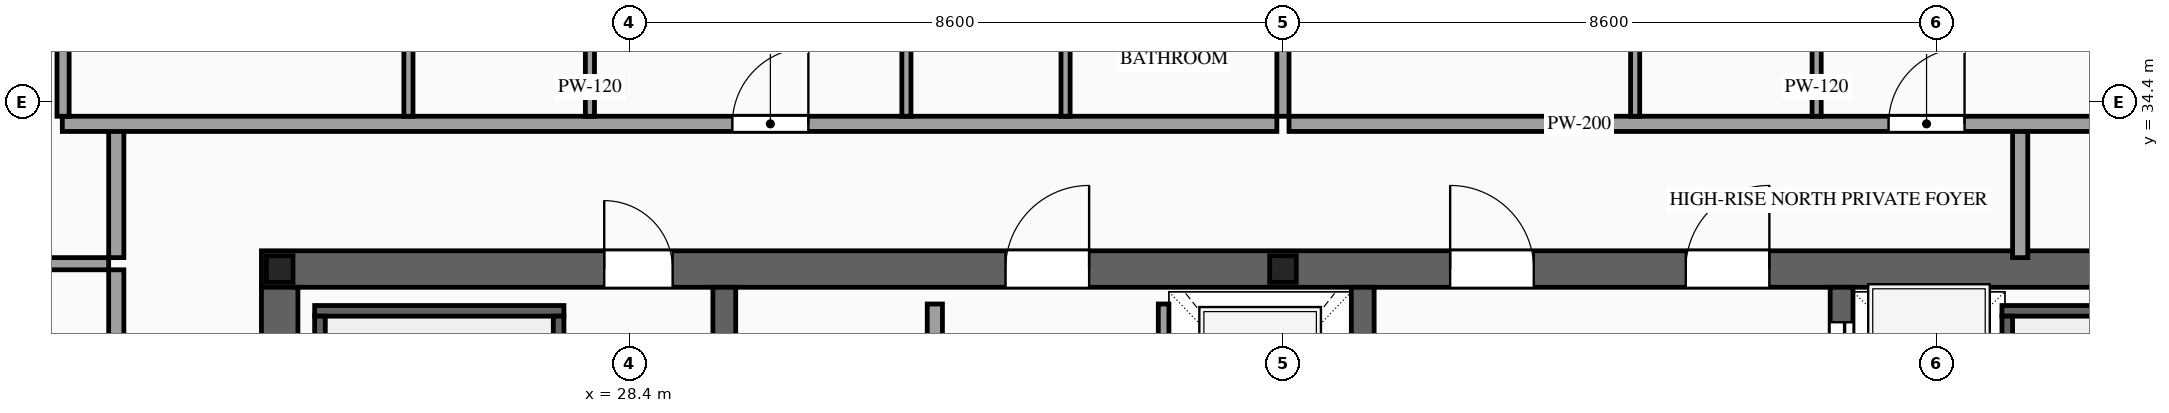
"""IFC4 building model, lengths in metres.
Left out: names, types, materials, properties, quantities, classifications, styles, units other than length and angle.
Written with IfcOpenShell. Run it as: python <this file> out.ifc"""

import sys

from ifc_helpers import new_model, si_unit, direction, frame, frame_2d, origin, origin_2d, place, context, subcontext, project, spatial, rectangle, i_section, extrude, source, transform, mapped, element, fill, save


model = new_model("IFC4")
c1 = context("Model", 3, precision=1e-05, world=origin(), true_north=direction((0.0, 1.0)))
c2 = subcontext(c1, "Body", "Model", "MODEL_VIEW")
j1 = project(units=[si_unit("LENGTHUNIT", "METRE"), si_unit("PLANEANGLEUNIT", "RADIAN")], contexts=[c1])
p1 = place(None, origin())
s1 = spatial("IfcSite", under=j1, at=p1, CompositionType="ELEMENT")
p2 = place(p1, origin())
s2 = spatial("IfcBuilding", under=s1, at=p2, CompositionType="ELEMENT")
p3 = place(p2, frame((0.0, 0.0, 335.7)))
s3 = spatial("IfcBuildingStorey", under=s2, at=p3, CompositionType="ELEMENT", Elevation=335.7)
p4 = place(p3, frame((23.56, 32.2, 0.0), z_axis=(0.0, 0.0, 1.0), x_axis=(1.0, 0.0, 0.0)))
e1 = element("IfcWall", 1, at=p4, inside=s3, PredefinedType="SHEAR", context=c2, shape_type="SweptSolid", body=[
    extrude(rectangle(XDim=26.88, YDim=0.48, at=frame_2d((13.44, 0.0))), origin(), (0.0, 0.0, 1.0), 3.5),
])
p5 = place(p4, frame((4.51, 0.0, 0.0)))
e2 = element("IfcOpeningElement", 2, at=p5, cuts=e1, PredefinedType="OPENING", context=c2, shape_type="SweptSolid", body=[
    extrude(rectangle(XDim=0.9, YDim=2.15, at=frame_2d((0.45, 1.075))), frame((0.0, 0.255, 0.0), z_axis=(0.0, -1.0, 0.0), x_axis=(1.0, 0.0, 0.0)), (0.0, 0.0, 1.0), 0.51),
])
p6 = place(p4, frame((9.79, 0.0, 0.0)))
e3 = element("IfcOpeningElement", 3, at=p6, cuts=e1, PredefinedType="OPENING", context=c2, shape_type="SweptSolid", body=[
    extrude(rectangle(XDim=1.1, YDim=2.2, at=frame_2d((0.55, 1.1))), frame((0.0, 0.255, 0.0), z_axis=(0.0, -1.0, 0.0), x_axis=(1.0, 0.0, 0.0)), (0.0, 0.0, 1.0), 0.51),
])
p7 = place(p4, frame((15.64, 0.0, 0.0)))
e4 = element("IfcOpeningElement", 4, at=p7, cuts=e1, PredefinedType="OPENING", context=c2, shape_type="SweptSolid", body=[
    extrude(rectangle(XDim=1.1, YDim=2.2, at=frame_2d((0.55, 1.1))), frame((0.0, 0.255, 0.0), z_axis=(0.0, -1.0, 0.0), x_axis=(1.0, 0.0, 0.0)), (0.0, 0.0, 1.0), 0.51),
])
p8 = place(p4, frame((18.74, 0.0, 0.0)))
e5 = element("IfcOpeningElement", 5, at=p8, cuts=e1, PredefinedType="OPENING", context=c2, shape_type="SweptSolid", body=[
    extrude(rectangle(XDim=1.1, YDim=2.2, at=frame_2d((0.55, 1.1))), frame((0.0, 0.255, 0.0), z_axis=(0.0, -1.0, 0.0), x_axis=(1.0, 0.0, 0.0)), (0.0, 0.0, 1.0), 0.51),
])
m1 = source(origin(), c2, "Body", "SweptSolid", [
    extrude(rectangle(XDim=12.32, YDim=0.48, at=frame_2d((6.16, 0.0))), origin(), (0.0, 0.0, 1.0), 3.5),
])
p9 = place(p3, frame((23.8, 19.64, 0.0), z_axis=(0.0, 0.0, 1.0), x_axis=(0.0, 1.0, 0.0)))
e6 = element("IfcWall", 6, at=p9, inside=s3, PredefinedType="SHEAR", context=c2, shape_type="MappedRepresentation", body=[
    mapped(m1, transform((0.0, 0.0, 0.0), scale=1.0)),
])
m2 = source(origin(), c2, "Body", "SweptSolid", [
    extrude(rectangle(XDim=12.32, YDim=0.3, at=frame_2d((6.16, 0.0))), origin(), (0.0, 0.0, 1.0), 3.5),
])
for number, where, z_axis, x_axis in (
    (7, (29.65, 19.64, 0.0), (0.0, 0.0, 1.0), (0.0, 1.0, 0.0)),
    (8, (38.05, 19.64, 0.0), (0.0, 0.0, 1.0), (0.0, 1.0, 0.0)),
):
    element("IfcWall", number, at=place(p3, frame(where, z_axis=z_axis, x_axis=x_axis)), inside=s3, PredefinedType="SOLIDWALL", context=c2, shape_type="MappedRepresentation", body=[
        mapped(m2, transform((0.0, 0.0, 0.0), scale=1.0)),
    ])
p10 = place(p3, frame((44.35, 19.64, 0.0), z_axis=(0.0, 0.0, 1.0), x_axis=(0.0, 1.0, 0.0)))
e9 = element("IfcWall", 9, at=p10, inside=s3, PredefinedType="SOLIDWALL", context=c2, shape_type="SweptSolid", body=[
    extrude(rectangle(XDim=12.32, YDim=0.3, at=frame_2d((6.16, 0.0))), origin(), (0.0, 0.0, 1.0), 3.5),
])
p11 = place(p10, frame((6.56, 0.0, 0.0)))
e10 = element("IfcOpeningElement", 10, at=p11, cuts=e9, PredefinedType="OPENING", context=c2, shape_type="SweptSolid", body=[
    extrude(rectangle(XDim=1.1, YDim=2.2, at=frame_2d((0.55, 1.1))), frame((0.0, 0.165, 0.0), z_axis=(0.0, -1.0, 0.0), x_axis=(1.0, 0.0, 0.0)), (0.0, 0.0, 1.0), 0.33),
])
p12 = place(p10, frame((8.66, 0.0, 0.0)))
e11 = element("IfcOpeningElement", 11, at=p12, cuts=e9, PredefinedType="OPENING", context=c2, shape_type="SweptSolid", body=[
    extrude(rectangle(XDim=1.1, YDim=2.2, at=frame_2d((0.55, 1.1))), frame((0.0, 0.165, 0.0), z_axis=(0.0, -1.0, 0.0), x_axis=(1.0, 0.0, 0.0)), (0.0, 0.0, 1.0), 0.33),
])
p13 = place(p10, frame((10.76, 0.0, 0.0)))
e12 = element("IfcOpeningElement", 12, at=p13, cuts=e9, PredefinedType="OPENING", context=c2, shape_type="SweptSolid", body=[
    extrude(rectangle(XDim=1.1, YDim=2.2, at=frame_2d((0.55, 1.1))), frame((0.0, 0.165, 0.0), z_axis=(0.0, -1.0, 0.0), x_axis=(1.0, 0.0, 0.0)), (0.0, 0.0, 1.0), 0.33),
])
m3 = source(origin(), c2, "Body", "SweptSolid", [
    extrude(i_section(OverallWidth=0.35, OverallDepth=0.35, WebThickness=0.012, FlangeThickness=0.019, at=origin_2d()), origin(), (0.0, 0.0, 1.0), 3.5),
])
for number, where, z_axis, x_axis in (
    (13, (23.8, 32.2, 0.0), (0.0, 0.0, 1.0), (1.0, 0.0, 0.0)),
    (14, (37.0, 32.2, 0.0), (0.0, 0.0, 1.0), (1.0, 0.0, 0.0)),
):
    element("IfcColumn", number, at=place(p3, frame(where, z_axis=z_axis, x_axis=x_axis)), inside=s3, PredefinedType="COLUMN", context=c2, shape_type="MappedRepresentation", body=[
        mapped(m3, transform((0.0, 0.0, 0.0), scale=1.0)),
    ])
p14 = place(p3, frame((35.43, 29.4, 0.0), z_axis=(0.0, 0.0, 1.0), x_axis=(0.0, 1.0, 0.0)))
e15 = element("IfcWall", 15, at=p14, inside=s3, PredefinedType="SOLIDWALL", context=c2, shape_type="SweptSolid", body=[
    extrude(rectangle(XDim=2.34, YDim=0.14, at=frame_2d((1.17, 0.0))), origin(), (0.0, 0.0, 1.0), 3.26),
])
p15 = place(p14, frame((0.62, 0.0, 0.0)))
e16 = element("IfcOpeningElement", 16, at=p15, cuts=e15, PredefinedType="OPENING", context=c2, shape_type="SweptSolid", body=[
    extrude(rectangle(XDim=1.1, YDim=2.2, at=frame_2d((0.55, 1.1))), frame((0.0, 0.085, 0.0), z_axis=(0.0, -1.0, 0.0), x_axis=(1.0, 0.0, 0.0)), (0.0, 0.0, 1.0), 0.17),
])
m4 = source(origin(), c2, "Body", "SweptSolid", [
    extrude(rectangle(XDim=3.28, YDim=0.14, at=frame_2d((1.64, 0.0))), origin(), (0.0, 0.0, 1.0), 3.26),
])
p16 = place(p3, frame((24.26, 31.65, 0.0), z_axis=(0.0, 0.0, 1.0), x_axis=(1.0, 0.0, 0.0)))
e17 = element("IfcWall", 17, at=p16, inside=s3, PredefinedType="SOLIDWALL", context=c2, shape_type="MappedRepresentation", body=[
    mapped(m4, transform((0.0, 0.0, 0.0), scale=1.0)),
])
m5 = source(origin(), c2, "Body", "SweptSolid", [
    extrude(rectangle(XDim=8.94, YDim=0.14, at=frame_2d((4.47, 0.0))), origin(), (0.0, 0.0, 1.0), 3.26),
])
for number, where, z_axis, x_axis in (
    (18, (24.33, 22.64, 0.0), (0.0, 0.0, 1.0), (0.0, 1.0, 0.0)),
    (19, (27.47, 22.64, 0.0), (0.0, 0.0, 1.0), (0.0, 1.0, 0.0)),
):
    element("IfcWall", number, at=place(p3, frame(where, z_axis=z_axis, x_axis=x_axis)), inside=s3, PredefinedType="SOLIDWALL", context=c2, shape_type="MappedRepresentation", body=[
        mapped(m5, transform((0.0, 0.0, 0.0), scale=1.0)),
    ])
p17 = place(p3, frame((46.46, 31.65, 0.0), z_axis=(0.0, 0.0, 1.0), x_axis=(1.0, 0.0, 0.0)))
e20 = element("IfcWall", 20, at=p17, inside=s3, PredefinedType="SOLIDWALL", context=c2, shape_type="MappedRepresentation", body=[
    mapped(m4, transform((0.0, 0.0, 0.0), scale=1.0)),
])
p18 = place(p3, frame((46.53, 22.64, 0.0), z_axis=(0.0, 0.0, 1.0), x_axis=(0.0, 1.0, 0.0)))
e21 = element("IfcWall", 21, at=p18, inside=s3, PredefinedType="SOLIDWALL", context=c2, shape_type="MappedRepresentation", body=[
    mapped(m5, transform((0.0, 0.0, 0.0), scale=1.0)),
])
p19 = place(p3, frame((32.42, 24.05, 0.0), z_axis=(0.0, 0.0, 1.0), x_axis=(0.0, 1.0, 0.0)))
e22 = element("IfcWall", 22, at=p19, inside=s3, PredefinedType="PARTITIONING", context=c2, shape_type="SweptSolid", body=[
    extrude(rectangle(XDim=7.69, YDim=0.2, at=frame_2d((3.845, 0.0))), origin(), (0.0, 0.0, 1.0), 3.26),
])
p20 = place(p19, frame((3.395, 0.0, 0.0)))
e23 = element("IfcOpeningElement", 23, at=p20, cuts=e22, PredefinedType="OPENING", context=c2, shape_type="SweptSolid", body=[
    extrude(rectangle(XDim=0.9, YDim=2.15, at=frame_2d((0.45, 1.075))), frame((0.0, 0.115, 0.0), z_axis=(0.0, -1.0, 0.0), x_axis=(1.0, 0.0, 0.0)), (0.0, 0.0, 1.0), 0.23),
])
m6 = source(origin(), c2, "Body", "SweptSolid", [
    extrude(rectangle(XDim=1.7, YDim=0.2, at=frame_2d((0.85, 0.0))), origin(), (0.0, 0.0, 1.0), 3.26),
])
for number, where, z_axis, x_axis in (
    (24, (21.65, 32.35, 0.0), (0.0, 0.0, 1.0), (0.0, 1.0, 0.0)),
    (25, (46.7, 32.35, 0.0), (0.0, 0.0, 1.0), (0.0, 1.0, 0.0)),
):
    element("IfcWall", number, at=place(p3, frame(where, z_axis=z_axis, x_axis=x_axis)), inside=s3, PredefinedType="PARTITIONING", context=c2, shape_type="MappedRepresentation", body=[
        mapped(m6, transform((0.0, 0.0, 0.0), scale=1.0)),
    ])
p21 = place(p3, frame((20.94, 34.11, 0.0), z_axis=(0.0, 0.0, 1.0), x_axis=(1.0, 0.0, 0.0)))
e26 = element("IfcWall", 26, at=p21, inside=s3, PredefinedType="PARTITIONING", context=c2, shape_type="SweptSolid", body=[
    extrude(rectangle(XDim=15.98, YDim=0.2, at=frame_2d((7.99, 0.0))), origin(), (0.0, 0.0, 1.0), 3.26),
])
p22 = place(p21, frame((8.816, 0.0, 0.0)))
e27 = element("IfcOpeningElement", 27, at=p22, cuts=e26, PredefinedType="OPENING", context=c2, shape_type="SweptSolid", body=[
    extrude(rectangle(XDim=1.0, YDim=2.2, at=frame_2d((0.5, 1.1))), frame((0.0, 0.115, 0.0), z_axis=(0.0, -1.0, 0.0), x_axis=(1.0, 0.0, 0.0)), (0.0, 0.0, 1.0), 0.23),
])
m7 = source(origin(), c2, "Body", "SweptSolid", [
    extrude(rectangle(XDim=10.54, YDim=0.16, at=frame_2d((5.27, 0.0))), origin(), (0.0, 0.0, 1.0), 2.767),
])
p23 = place(p3, frame((37.0, 34.21, 0.0), z_axis=(0.0, 0.0, 1.0), x_axis=(0.0, 1.0, 0.0)))
e28 = element("IfcWall", 28, at=p23, inside=s3, PredefinedType="PARTITIONING", context=c2, shape_type="MappedRepresentation", body=[
    mapped(m7, transform((0.0, 0.0, 0.0), scale=1.0)),
])
m8 = source(origin(), c2, "Body", "SweptSolid", [
    extrude(rectangle(XDim=2.9, YDim=0.12, at=frame_2d((1.45, 0.0))), origin(), (0.0, 0.0, 1.0), 3.26),
])
p24 = place(p3, frame((25.494, 34.21, 0.0), z_axis=(0.0, 0.0, 1.0), x_axis=(0.0, 1.0, 0.0)))
e29 = element("IfcWall", 29, at=p24, inside=s3, PredefinedType="PARTITIONING", context=c2, shape_type="MappedRepresentation", body=[
    mapped(m8, transform((0.0, 0.0, 0.0), scale=1.0)),
])
p25 = place(p3, frame((27.882, 34.21, 0.0), z_axis=(0.0, 0.0, 1.0), x_axis=(0.0, 1.0, 0.0)))
e30 = element("IfcWall", 30, at=p25, inside=s3, PredefinedType="PARTITIONING", context=c2, shape_type="SweptSolid", body=[
    extrude(rectangle(XDim=2.9, YDim=0.12, at=frame_2d((1.45, 0.0))), origin(), (0.0, 0.0, 1.0), 3.26),
])
p26 = place(p25, frame((1.025, 0.0, 0.0)))
e31 = element("IfcOpeningElement", 31, at=p26, cuts=e30, PredefinedType="OPENING", context=c2, shape_type="SweptSolid", body=[
    extrude(rectangle(XDim=0.85, YDim=2.1, at=frame_2d((0.425, 1.05))), frame((0.0, 0.075, 0.0), z_axis=(0.0, -1.0, 0.0), x_axis=(1.0, 0.0, 0.0)), (0.0, 0.0, 1.0), 0.15),
])
for number, where, z_axis, x_axis in (
    (32, (34.14, 34.21, 0.0), (0.0, 0.0, 1.0), (0.0, 1.0, 0.0)),
    (33, (32.046, 34.21, 0.0), (0.0, 0.0, 1.0), (0.0, 1.0, 0.0)),
):
    element("IfcWall", number, at=place(p3, frame(where, z_axis=z_axis, x_axis=x_axis)), inside=s3, PredefinedType="PARTITIONING", context=c2, shape_type="MappedRepresentation", body=[
        mapped(m8, transform((0.0, 0.0, 0.0), scale=1.0)),
    ])
p27 = place(p3, frame((37.08, 34.11, 0.0), z_axis=(0.0, 0.0, 1.0), x_axis=(1.0, 0.0, 0.0)))
e34 = element("IfcWall", 34, at=p27, inside=s3, PredefinedType="PARTITIONING", context=c2, shape_type="SweptSolid", body=[
    extrude(rectangle(XDim=15.98, YDim=0.2, at=frame_2d((7.99, 0.0))), origin(), (0.0, 0.0, 1.0), 3.26),
])
p28 = place(p27, frame((7.888, 0.0, 0.0)))
e35 = element("IfcOpeningElement", 35, at=p28, cuts=e34, PredefinedType="OPENING", context=c2, shape_type="SweptSolid", body=[
    extrude(rectangle(XDim=1.0, YDim=2.2, at=frame_2d((0.5, 1.1))), frame((0.0, 0.115, 0.0), z_axis=(0.0, -1.0, 0.0), x_axis=(1.0, 0.0, 0.0)), (0.0, 0.0, 1.0), 0.23),
])
m9 = source(origin(), c2, "Body", "SweptSolid", [
    extrude(rectangle(XDim=10.39, YDim=0.16, at=frame_2d((5.195, 0.0))), origin(), (0.0, 0.0, 1.0), 3.26),
])
p29 = place(p3, frame((20.95, 34.21, 0.0), z_axis=(0.0, 0.0, 1.0), x_axis=(0.0, 1.0, 0.0)))
e36 = element("IfcWall", 36, at=p29, inside=s3, PredefinedType="PARTITIONING", context=c2, shape_type="MappedRepresentation", body=[
    mapped(m9, transform((0.0, 0.0, 0.0), scale=1.0)),
])
p30 = place(p3, frame((41.634, 34.21, 0.0), z_axis=(0.0, 0.0, 1.0), x_axis=(0.0, 1.0, 0.0)))
e37 = element("IfcWall", 37, at=p30, inside=s3, PredefinedType="PARTITIONING", context=c2, shape_type="MappedRepresentation", body=[
    mapped(m8, transform((0.0, 0.0, 0.0), scale=1.0)),
])
p31 = place(p3, frame((44.022, 34.21, 0.0), z_axis=(0.0, 0.0, 1.0), x_axis=(0.0, 1.0, 0.0)))
e38 = element("IfcWall", 38, at=p31, inside=s3, PredefinedType="PARTITIONING", context=c2, shape_type="SweptSolid", body=[
    extrude(rectangle(XDim=2.9, YDim=0.12, at=frame_2d((1.45, 0.0))), origin(), (0.0, 0.0, 1.0), 3.26),
])
p32 = place(p31, frame((1.025, 0.0, 0.0)))
e39 = element("IfcOpeningElement", 39, at=p32, cuts=e38, PredefinedType="OPENING", context=c2, shape_type="SweptSolid", body=[
    extrude(rectangle(XDim=0.85, YDim=2.1, at=frame_2d((0.425, 1.05))), frame((0.0, 0.075, 0.0), z_axis=(0.0, -1.0, 0.0), x_axis=(1.0, 0.0, 0.0)), (0.0, 0.0, 1.0), 0.15),
])
p33 = place(p3, frame((21.65, 19.41, 0.0), z_axis=(0.0, 0.0, 1.0), x_axis=(0.0, 1.0, 0.0)))
e40 = element("IfcWall", 40, at=p33, inside=s3, PredefinedType="PARTITIONING", context=c2, shape_type="SweptSolid", body=[
    extrude(rectangle(XDim=12.78, YDim=0.2, at=frame_2d((6.39, 0.0))), origin(), (0.0, 0.0, 1.0), 3.26),
])
p34 = place(p33, frame((5.89, 0.0, 0.0)))
e41 = element("IfcOpeningElement", 41, at=p34, cuts=e40, PredefinedType="OPENING", context=c2, shape_type="SweptSolid", body=[
    extrude(rectangle(XDim=1.0, YDim=2.2, at=frame_2d((0.5, 1.1))), frame((0.0, 0.115, 0.0), z_axis=(0.0, -1.0, 0.0), x_axis=(1.0, 0.0, 0.0)), (0.0, 0.0, 1.0), 0.23),
])
m10 = source(origin(), c2, "Body", "SweptSolid", [
    extrude(rectangle(XDim=3.5, YDim=0.16, at=frame_2d((1.75, 0.0))), origin(), (0.0, 0.0, 1.0), 2.805),
])
p35 = place(p3, frame((18.05, 32.27, 0.0), z_axis=(0.0, 0.0, 1.0), x_axis=(1.0, 0.0, 0.0)))
e42 = element("IfcWall", 42, at=p35, inside=s3, PredefinedType="PARTITIONING", context=c2, shape_type="MappedRepresentation", body=[
    mapped(m10, transform((0.0, 0.0, 0.0), scale=1.0)),
])
m11 = source(origin(), c2, "Body", "SweptSolid", [
    extrude(rectangle(XDim=1.1, YDim=2.2, at=frame_2d((0.55, 1.1))), frame((0.0, 0.025, 0.0), z_axis=(0.0, -1.0, 0.0), x_axis=(1.0, 0.0, 0.0)), (0.0, 0.0, 1.0), 0.05),
])
p36 = place(p13, origin())
e43 = element("IfcDoor", 43, at=p36, inside=s3, OperationType="SLIDING_TO_LEFT", PredefinedType="DOOR", context=c2, shape_type="MappedRepresentation", body=[
    mapped(m11, transform((0.0, 0.0, 0.0), scale=1.0)),
])
fill(e12, e43)
m12 = source(origin(), c2, "Body", "SweptSolid", [
    extrude(rectangle(XDim=0.9, YDim=2.15, at=frame_2d((0.45, 1.075))), frame((0.0, 0.025, 0.0), z_axis=(0.0, -1.0, 0.0), x_axis=(1.0, 0.0, 0.0)), (0.0, 0.0, 1.0), 0.05),
])
p37 = place(p5, origin())
e44 = element("IfcDoor", 44, at=p37, inside=s3, OperationType="SINGLE_SWING_LEFT", PredefinedType="DOOR", context=c2, shape_type="MappedRepresentation", body=[
    mapped(m12, transform((0.0, 0.0, 0.0), scale=1.0)),
])
fill(e2, e44)
m13 = source(origin(), c2, "Body", "SweptSolid", [
    extrude(rectangle(XDim=1.1, YDim=2.2, at=frame_2d((0.55, 1.1))), frame((0.0, 0.025, 0.0), z_axis=(0.0, -1.0, 0.0), x_axis=(1.0, 0.0, 0.0)), (0.0, 0.0, 1.0), 0.05),
])
p38 = place(p6, origin())
e45 = element("IfcDoor", 45, at=p38, inside=s3, OperationType="SINGLE_SWING_RIGHT", PredefinedType="DOOR", context=c2, shape_type="MappedRepresentation", body=[
    mapped(m13, transform((0.0, 0.0, 0.0), scale=1.0)),
])
fill(e3, e45)
p39 = place(p7, origin())
e46 = element("IfcDoor", 46, at=p39, inside=s3, OperationType="SINGLE_SWING_LEFT", PredefinedType="DOOR", context=c2, shape_type="MappedRepresentation", body=[
    mapped(m13, transform((0.0, 0.0, 0.0), scale=1.0)),
])
fill(e4, e46)
p40 = place(p8, origin())
e47 = element("IfcDoor", 47, at=p40, inside=s3, OperationType="SINGLE_SWING_RIGHT", PredefinedType="DOOR", context=c2, shape_type="MappedRepresentation", body=[
    mapped(m13, transform((0.0, 0.0, 0.0), scale=1.0)),
])
fill(e5, e47)
m14 = source(origin(), c2, "Body", "SweptSolid", [
    extrude(rectangle(XDim=1.0, YDim=2.2, at=frame_2d((0.5, 1.1))), frame((0.0, 0.025, 0.0), z_axis=(0.0, -1.0, 0.0), x_axis=(1.0, 0.0, 0.0)), (0.0, 0.0, 1.0), 0.05),
])
p41 = place(p22, origin())
e48 = element("IfcDoor", 48, at=p41, inside=s3, OperationType="SINGLE_SWING_RIGHT", PredefinedType="DOOR", context=c2, shape_type="MappedRepresentation", body=[
    mapped(m14, transform((0.0, 0.0, 0.0), scale=1.0)),
])
fill(e27, e48)
p42 = place(p28, origin())
e49 = element("IfcDoor", 49, at=p42, inside=s3, OperationType="SINGLE_SWING_RIGHT", PredefinedType="DOOR", context=c2, shape_type="MappedRepresentation", body=[
    mapped(m14, transform((0.0, 0.0, 0.0), scale=1.0)),
])
fill(e35, e49)
save(model, sys.argv[1])
